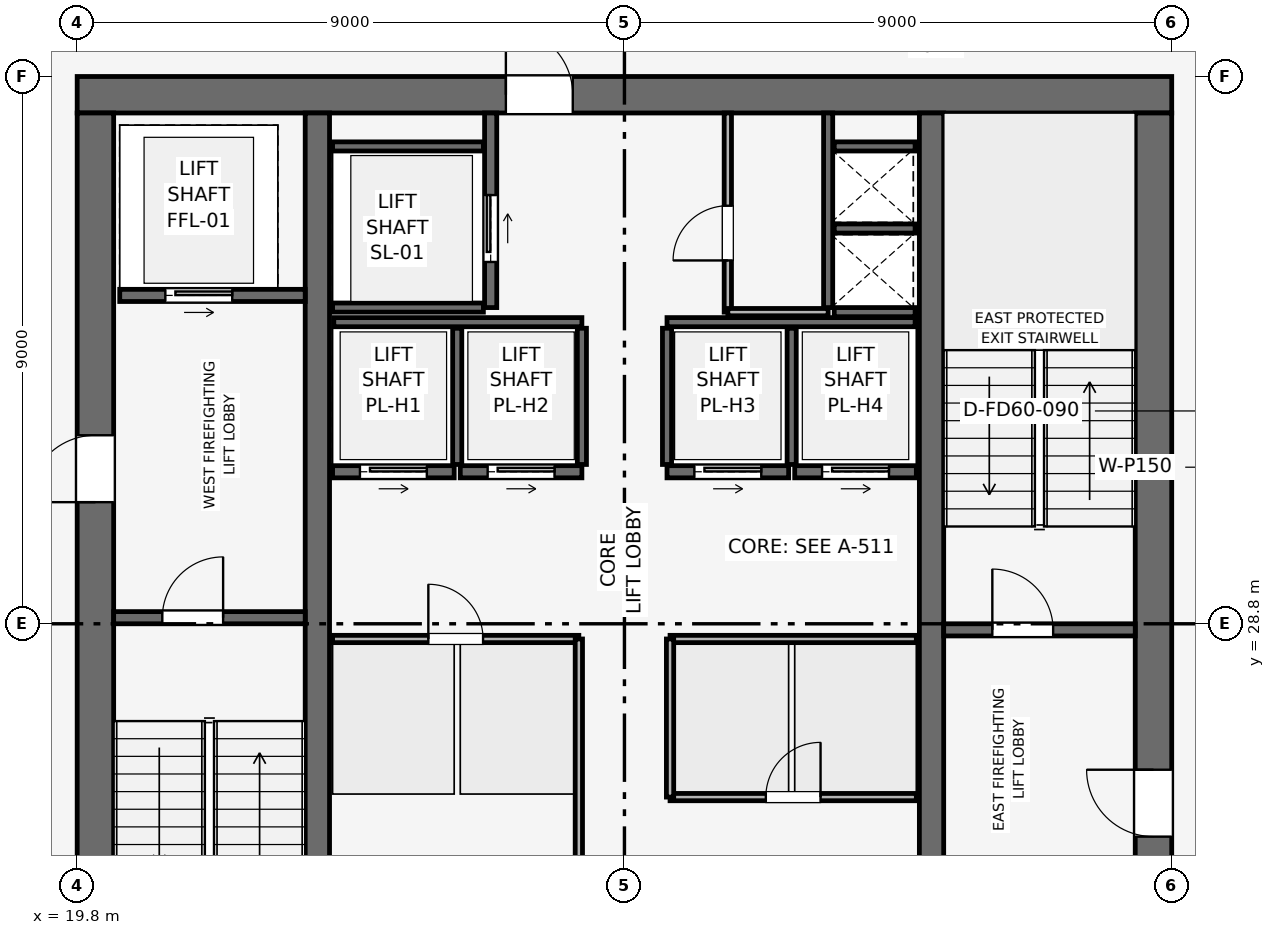
"""IFC4 building model, lengths in metres.
Left out: names, types, materials, properties, quantities, classifications, styles, units other than length and angle.
Written with IfcOpenShell. Run it as: python <this file> out.ifc"""

import sys

from ifc_helpers import new_model, si_unit, direction, frame, frame_2d, origin, place, context, subcontext, project, spatial, rectangle, extrude, element, fill, save


model = new_model("IFC4")
c1 = context("Model", 3, precision=1e-05, world=origin(), true_north=direction((0.0, 1.0)))
c2 = subcontext(c1, "Body", "Model", "MODEL_VIEW")
j1 = project(units=[si_unit("LENGTHUNIT", "METRE"), si_unit("PLANEANGLEUNIT", "RADIAN")], contexts=[c1])
p1 = place(None, origin())
s1 = spatial("IfcSite", under=j1, at=p1, CompositionType="ELEMENT")
p2 = place(p1, origin())
s2 = spatial("IfcBuilding", under=s1, at=p2, CompositionType="ELEMENT")
p3 = place(p2, frame((0.0, 0.0, 325.5)))
s3 = spatial("IfcBuildingStorey", under=s2, at=p3, CompositionType="ELEMENT", Elevation=325.5)
p4 = place(p3, frame((19.8, 37.5, 0.0), z_axis=(0.0, 0.0, 1.0), x_axis=(1.0, 0.0, 0.0)))
e1 = element("IfcWall", 1, at=p4, inside=s3, PredefinedType="SHEAR", context=c2, shape_type="SweptSolid", body=[
    extrude(rectangle(XDim=18.0, YDim=0.6, at=frame_2d((9.0, 0.0))), origin(), (0.0, 0.0, 1.0), 3.75),
])
p5 = place(p4, frame((7.05, 0.0, 0.0)))
e2 = element("IfcOpeningElement", 2, at=p5, cuts=e1, PredefinedType="OPENING", context=c2, shape_type="SweptSolid", body=[
    extrude(rectangle(XDim=1.1, YDim=2.15, at=frame_2d((0.55, 1.075))), frame((0.0, 0.31, 0.0), z_axis=(0.0, -1.0, 0.0), x_axis=(1.0, 0.0, 0.0)), (0.0, 0.0, 1.0), 0.62),
])
p6 = place(p3, frame((20.1, 20.4, 0.0), z_axis=(0.0, 0.0, 1.0), x_axis=(0.0, 1.0, 0.0)))
e3 = element("IfcWall", 3, at=p6, inside=s3, PredefinedType="SHEAR", context=c2, shape_type="SweptSolid", body=[
    extrude(rectangle(XDim=16.8, YDim=0.6, at=frame_2d((8.4, 0.0))), origin(), (0.0, 0.0, 1.0), 3.75),
])
p7 = place(p6, frame((10.4, 0.0, 0.0)))
e4 = element("IfcOpeningElement", 4, at=p7, cuts=e3, PredefinedType="OPENING", context=c2, shape_type="SweptSolid", body=[
    extrude(rectangle(XDim=1.1, YDim=2.15, at=frame_2d((0.55, 1.075))), frame((0.0, 0.31, 0.0), z_axis=(0.0, -1.0, 0.0), x_axis=(1.0, 0.0, 0.0)), (0.0, 0.0, 1.0), 0.62),
])
p8 = place(p3, frame((37.5, 20.4, 0.0), z_axis=(0.0, 0.0, 1.0), x_axis=(0.0, 1.0, 0.0)))
e5 = element("IfcWall", 5, at=p8, inside=s3, PredefinedType="SHEAR", context=c2, shape_type="SweptSolid", body=[
    extrude(rectangle(XDim=16.8, YDim=0.6, at=frame_2d((8.4, 0.0))), origin(), (0.0, 0.0, 1.0), 3.75),
])
p9 = place(p8, frame((4.9, 0.0, 0.0)))
e6 = element("IfcOpeningElement", 6, at=p9, cuts=e5, PredefinedType="OPENING", context=c2, shape_type="SweptSolid", body=[
    extrude(rectangle(XDim=1.1, YDim=2.15, at=frame_2d((0.55, 1.075))), frame((0.0, 0.31, 0.0), z_axis=(0.0, -1.0, 0.0), x_axis=(1.0, 0.0, 0.0)), (0.0, 0.0, 1.0), 0.62),
])
for number, where, z_axis, x_axis in (
    (7, (23.75, 20.4, 0.0), (0.0, 0.0, 1.0), (0.0, 1.0, 0.0)),
    (8, (33.85, 20.4, 0.0), (0.0, 0.0, 1.0), (0.0, 1.0, 0.0)),
):
    element("IfcWall", number, at=place(p3, frame(where, z_axis=z_axis, x_axis=x_axis)), inside=s3, PredefinedType="SHEAR", context=c2, shape_type="SweptSolid", body=[
        extrude(rectangle(XDim=16.8, YDim=0.4, at=frame_2d((8.4, 0.0))), origin(), (0.0, 0.0, 1.0), 3.75),
    ])
p10 = place(p3, frame((20.4, 28.9, 0.0), z_axis=(0.0, 0.0, 1.0), x_axis=(1.0, 0.0, 0.0)))
e9 = element("IfcWall", 9, at=p10, inside=s3, PredefinedType="SHEAR", context=c2, shape_type="SweptSolid", body=[
    extrude(rectangle(XDim=3.15, YDim=0.2, at=frame_2d((1.575, 0.0))), origin(), (0.0, 0.0, 1.0), 3.51),
])
p11 = place(p10, frame((0.8, 0.0, 0.0)))
e10 = element("IfcOpeningElement", 10, at=p11, cuts=e9, PredefinedType="OPENING", context=c2, shape_type="SweptSolid", body=[
    extrude(rectangle(XDim=1.0, YDim=2.1, at=frame_2d((0.5, 1.05))), frame((0.0, 0.11, 0.0), z_axis=(0.0, -1.0, 0.0), x_axis=(1.0, 0.0, 0.0)), (0.0, 0.0, 1.0), 0.22),
])
p12 = place(p3, frame((34.05, 28.7, 0.0), z_axis=(0.0, 0.0, 1.0), x_axis=(1.0, 0.0, 0.0)))
e11 = element("IfcWall", 11, at=p12, inside=s3, PredefinedType="SHEAR", context=c2, shape_type="SweptSolid", body=[
    extrude(rectangle(XDim=3.15, YDim=0.2, at=frame_2d((1.575, 0.0))), origin(), (0.0, 0.0, 1.0), 3.51),
])
p13 = place(p12, frame((0.8, 0.0, 0.0)))
e12 = element("IfcOpeningElement", 12, at=p13, cuts=e11, PredefinedType="OPENING", context=c2, shape_type="SweptSolid", body=[
    extrude(rectangle(XDim=1.0, YDim=2.1, at=frame_2d((0.5, 1.05))), frame((0.0, 0.11, 0.0), z_axis=(0.0, -1.0, 0.0), x_axis=(1.0, 0.0, 0.0)), (0.0, 0.0, 1.0), 0.22),
])
p14 = place(p3, frame((32.15, 34.0, 0.0), z_axis=(0.0, 0.0, 1.0), x_axis=(0.0, 1.0, 0.0)))
e13 = element("IfcWall", 13, at=p14, inside=s3, PredefinedType="SHEAR", context=c2, shape_type="SweptSolid", body=[
    extrude(rectangle(XDim=3.2, YDim=0.15, at=frame_2d((1.6, 0.0))), origin(), (0.0, 0.0, 1.0), 3.51),
])
for number, where, z_axis, x_axis in (
    (14, (32.25, 33.925, 0.0), (0.0, 0.0, 1.0), (1.0, 0.0, 0.0)),
    (15, (32.25, 35.3, 0.0), (0.0, 0.0, 1.0), (1.0, 0.0, 0.0)),
):
    element("IfcWall", number, at=place(p3, frame(where, z_axis=z_axis, x_axis=x_axis)), inside=s3, PredefinedType="SHEAR", context=c2, shape_type="SweptSolid", body=[
        extrude(rectangle(XDim=1.33, YDim=0.15, at=frame_2d((0.665, 0.0))), origin(), (0.0, 0.0, 1.0), 3.51),
    ])
p15 = place(p3, frame((20.5, 34.2, 0.0), z_axis=(0.0, 0.0, 1.0), x_axis=(1.0, 0.0, 0.0)))
e16 = element("IfcWall", 16, at=p15, inside=s3, PredefinedType="SHEAR", context=c2, shape_type="SweptSolid", body=[
    extrude(rectangle(XDim=3.05, YDim=0.2, at=frame_2d((1.525, 0.0))), origin(), (0.0, 0.0, 1.0), 3.51),
])
p16 = place(p15, frame((0.75, 0.0, 0.0)))
e17 = element("IfcOpeningElement", 17, at=p16, cuts=e16, PredefinedType="OPENING", context=c2, shape_type="SweptSolid", body=[
    extrude(rectangle(XDim=1.1, YDim=2.15, at=frame_2d((0.55, 1.075))), frame((0.0, 0.11, 0.0), z_axis=(0.0, -1.0, 0.0), x_axis=(1.0, 0.0, 0.0)), (0.0, 0.0, 1.0), 0.22),
])
p17 = place(p3, frame((26.6, 34.0, 0.0), z_axis=(0.0, 0.0, 1.0), x_axis=(0.0, 1.0, 0.0)))
e18 = element("IfcWall", 18, at=p17, inside=s3, PredefinedType="SHEAR", context=c2, shape_type="SweptSolid", body=[
    extrude(rectangle(XDim=3.2, YDim=0.2, at=frame_2d((1.6, 0.0))), origin(), (0.0, 0.0, 1.0), 3.51),
])
p18 = place(p17, frame((0.75, 0.0, 0.0)))
e19 = element("IfcOpeningElement", 19, at=p18, cuts=e18, PredefinedType="OPENING", context=c2, shape_type="SweptSolid", body=[
    extrude(rectangle(XDim=1.1, YDim=2.15, at=frame_2d((0.55, 1.075))), frame((0.0, 0.11, 0.0), z_axis=(0.0, -1.0, 0.0), x_axis=(1.0, 0.0, 0.0)), (0.0, 0.0, 1.0), 0.22),
])
for number, where, z_axis, x_axis in (
    (20, (24.0, 34.0, 0.0), (0.0, 0.0, 1.0), (1.0, 0.0, 0.0)),
    (21, (24.0, 36.65, 0.0), (0.0, 0.0, 1.0), (1.0, 0.0, 0.0)),
):
    element("IfcWall", number, at=place(p3, frame(where, z_axis=z_axis, x_axis=x_axis)), inside=s3, PredefinedType="SHEAR", context=c2, shape_type="SweptSolid", body=[
        extrude(rectangle(XDim=2.48, YDim=0.15, at=frame_2d((1.24, 0.0))), origin(), (0.0, 0.0, 1.0), 3.51),
    ])
p19 = place(p3, frame((24.0, 31.3, 0.0), z_axis=(0.0, 0.0, 1.0), x_axis=(1.0, 0.0, 0.0)))
e22 = element("IfcWall", 22, at=p19, inside=s3, PredefinedType="SHEAR", context=c2, shape_type="SweptSolid", body=[
    extrude(rectangle(XDim=2.0, YDim=0.2, at=frame_2d((1.0, 0.0))), origin(), (0.0, 0.0, 1.0), 3.51),
])
p20 = place(p19, frame((0.45, 0.0, 0.0)))
e23 = element("IfcOpeningElement", 23, at=p20, cuts=e22, PredefinedType="OPENING", context=c2, shape_type="SweptSolid", body=[
    extrude(rectangle(XDim=1.1, YDim=2.15, at=frame_2d((0.55, 1.075))), frame((0.0, 0.11, 0.0), z_axis=(0.0, -1.0, 0.0), x_axis=(1.0, 0.0, 0.0)), (0.0, 0.0, 1.0), 0.22),
])
p21 = place(p3, frame((26.1, 31.3, 0.0), z_axis=(0.0, 0.0, 1.0), x_axis=(1.0, 0.0, 0.0)))
e24 = element("IfcWall", 24, at=p21, inside=s3, PredefinedType="SHEAR", context=c2, shape_type="SweptSolid", body=[
    extrude(rectangle(XDim=2.0, YDim=0.2, at=frame_2d((1.0, 0.0))), origin(), (0.0, 0.0, 1.0), 3.51),
])
p22 = place(p21, frame((0.45, 0.0, 0.0)))
e25 = element("IfcOpeningElement", 25, at=p22, cuts=e24, PredefinedType="OPENING", context=c2, shape_type="SweptSolid", body=[
    extrude(rectangle(XDim=1.1, YDim=2.15, at=frame_2d((0.55, 1.075))), frame((0.0, 0.11, 0.0), z_axis=(0.0, -1.0, 0.0), x_axis=(1.0, 0.0, 0.0)), (0.0, 0.0, 1.0), 0.22),
])
p23 = place(p3, frame((29.5, 31.3, 0.0), z_axis=(0.0, 0.0, 1.0), x_axis=(1.0, 0.0, 0.0)))
e26 = element("IfcWall", 26, at=p23, inside=s3, PredefinedType="SHEAR", context=c2, shape_type="SweptSolid", body=[
    extrude(rectangle(XDim=2.0, YDim=0.2, at=frame_2d((1.0, 0.0))), origin(), (0.0, 0.0, 1.0), 3.51),
])
p24 = place(p23, frame((0.45, 0.0, 0.0)))
e27 = element("IfcOpeningElement", 27, at=p24, cuts=e26, PredefinedType="OPENING", context=c2, shape_type="SweptSolid", body=[
    extrude(rectangle(XDim=1.1, YDim=2.15, at=frame_2d((0.55, 1.075))), frame((0.0, 0.11, 0.0), z_axis=(0.0, -1.0, 0.0), x_axis=(1.0, 0.0, 0.0)), (0.0, 0.0, 1.0), 0.22),
])
p25 = place(p3, frame((31.6, 31.3, 0.0), z_axis=(0.0, 0.0, 1.0), x_axis=(1.0, 0.0, 0.0)))
e28 = element("IfcWall", 28, at=p25, inside=s3, PredefinedType="SHEAR", context=c2, shape_type="SweptSolid", body=[
    extrude(rectangle(XDim=2.0, YDim=0.2, at=frame_2d((1.0, 0.0))), origin(), (0.0, 0.0, 1.0), 3.51),
])
p26 = place(p25, frame((0.45, 0.0, 0.0)))
e29 = element("IfcOpeningElement", 29, at=p26, cuts=e28, PredefinedType="OPENING", context=c2, shape_type="SweptSolid", body=[
    extrude(rectangle(XDim=1.1, YDim=2.15, at=frame_2d((0.55, 1.075))), frame((0.0, 0.11, 0.0), z_axis=(0.0, -1.0, 0.0), x_axis=(1.0, 0.0, 0.0)), (0.0, 0.0, 1.0), 0.22),
])
p27 = place(p3, frame((32.25, 36.65, 0.0), z_axis=(0.0, 0.0, 1.0), x_axis=(1.0, 0.0, 0.0)))
e30 = element("IfcWall", 30, at=p27, inside=s3, PredefinedType="SHEAR", context=c2, shape_type="SweptSolid", body=[
    extrude(rectangle(XDim=1.33, YDim=0.15, at=frame_2d((0.665, 0.0))), origin(), (0.0, 0.0, 1.0), 3.51),
])
for number, where, z_axis, x_axis in (
    (31, (24.02, 33.76, 0.0), (0.0, 0.0, 1.0), (1.0, 0.0, 0.0)),
    (32, (29.5, 33.76, 0.0), (0.0, 0.0, 1.0), (1.0, 0.0, 0.0)),
):
    element("IfcWall", number, at=place(p3, frame(where, z_axis=z_axis, x_axis=x_axis)), inside=s3, PredefinedType="SHEAR", context=c2, shape_type="SweptSolid", body=[
        extrude(rectangle(XDim=4.08, YDim=0.15, at=frame_2d((2.04, 0.0))), origin(), (0.0, 0.0, 1.0), 3.51),
    ])
for number, where, z_axis, x_axis in (
    (33, (26.05, 31.42, 0.0), (0.0, 0.0, 1.0), (0.0, 1.0, 0.0)),
    (34, (28.1, 31.42, 0.0), (0.0, 0.0, 1.0), (0.0, 1.0, 0.0)),
    (35, (29.5, 31.42, 0.0), (0.0, 0.0, 1.0), (0.0, 1.0, 0.0)),
    (36, (31.55, 31.42, 0.0), (0.0, 0.0, 1.0), (0.0, 1.0, 0.0)),
):
    element("IfcWall", number, at=place(p3, frame(where, z_axis=z_axis, x_axis=x_axis)), inside=s3, PredefinedType="SHEAR", context=c2, shape_type="SweptSolid", body=[
        extrude(rectangle(XDim=2.24, YDim=0.15, at=frame_2d((1.12, 0.0))), origin(), (0.0, 0.0, 1.0), 3.51),
    ])
p28 = place(p3, frame((30.5, 33.925, 0.0), z_axis=(0.0, 0.0, 1.0), x_axis=(0.0, 1.0, 0.0)))
e37 = element("IfcWall", 37, at=p28, inside=s3, PredefinedType="PARTITIONING", context=c2, shape_type="SweptSolid", body=[
    extrude(rectangle(XDim=3.275, YDim=0.12, at=frame_2d((1.637, 0.0))), origin(), (0.0, 0.0, 1.0), 3.51),
])
p29 = place(p28, frame((0.85, 0.0, 0.0)))
e38 = element("IfcOpeningElement", 38, at=p29, cuts=e37, PredefinedType="OPENING", context=c2, shape_type="SweptSolid", body=[
    extrude(rectangle(XDim=0.9, YDim=2.1, at=frame_2d((0.45, 1.05))), frame((0.0, 0.07, 0.0), z_axis=(0.0, -1.0, 0.0), x_axis=(1.0, 0.0, 0.0)), (0.0, 0.0, 1.0), 0.14),
])
p30 = place(p3, frame((30.5, 33.925, 0.0), z_axis=(0.0, 0.0, 1.0), x_axis=(1.0, 0.0, 0.0)))
e39 = element("IfcWall", 39, at=p30, inside=s3, PredefinedType="PARTITIONING", context=c2, shape_type="SweptSolid", body=[
    extrude(rectangle(XDim=1.65, YDim=0.12, at=frame_2d((0.825, 0.0))), origin(), (0.0, 0.0, 1.0), 3.51),
])
p31 = place(p3, frame((24.0, 28.55, 0.0), z_axis=(0.0, 0.0, 1.0), x_axis=(1.0, 0.0, 0.0)))
e40 = element("IfcWall", 40, at=p31, inside=s3, PredefinedType="PARTITIONING", context=c2, shape_type="SweptSolid", body=[
    extrude(rectangle(XDim=4.05, YDim=0.12, at=frame_2d((2.025, 0.0))), origin(), (0.0, 0.0, 1.0), 3.51),
])
p32 = place(p31, frame((1.575, 0.0, 0.0)))
e41 = element("IfcOpeningElement", 41, at=p32, cuts=e40, PredefinedType="OPENING", context=c2, shape_type="SweptSolid", body=[
    extrude(rectangle(XDim=0.9, YDim=2.1, at=frame_2d((0.45, 1.05))), frame((0.0, 0.07, 0.0), z_axis=(0.0, -1.0, 0.0), x_axis=(1.0, 0.0, 0.0)), (0.0, 0.0, 1.0), 0.14),
])
p33 = place(p3, frame((28.05, 20.4, 0.0), z_axis=(0.0, 0.0, 1.0), x_axis=(0.0, 1.0, 0.0)))
e42 = element("IfcWall", 42, at=p33, inside=s3, PredefinedType="PARTITIONING", context=c2, shape_type="SweptSolid", body=[
    extrude(rectangle(XDim=8.15, YDim=0.12, at=frame_2d((4.075, 0.0))), origin(), (0.0, 0.0, 1.0), 3.51),
])
p34 = place(p3, frame((29.55, 25.95, 0.0), z_axis=(0.0, 0.0, 1.0), x_axis=(1.0, 0.0, 0.0)))
e43 = element("IfcWall", 43, at=p34, inside=s3, PredefinedType="PARTITIONING", context=c2, shape_type="SweptSolid", body=[
    extrude(rectangle(XDim=4.05, YDim=0.12, at=frame_2d((2.025, 0.0))), origin(), (0.0, 0.0, 1.0), 3.51),
])
p35 = place(p34, frame((1.575, 0.0, 0.0)))
e44 = element("IfcOpeningElement", 44, at=p35, cuts=e43, PredefinedType="OPENING", context=c2, shape_type="SweptSolid", body=[
    extrude(rectangle(XDim=0.9, YDim=2.1, at=frame_2d((0.45, 1.05))), frame((0.0, 0.07, 0.0), z_axis=(0.0, -1.0, 0.0), x_axis=(1.0, 0.0, 0.0)), (0.0, 0.0, 1.0), 0.14),
])
p36 = place(p3, frame((29.55, 28.55, 0.0), z_axis=(0.0, 0.0, 1.0), x_axis=(1.0, 0.0, 0.0)))
e45 = element("IfcWall", 45, at=p36, inside=s3, PredefinedType="PARTITIONING", context=c2, shape_type="SweptSolid", body=[
    extrude(rectangle(XDim=4.05, YDim=0.12, at=frame_2d((2.025, 0.0))), origin(), (0.0, 0.0, 1.0), 3.51),
])
p37 = place(p3, frame((29.55, 25.95, 0.0), z_axis=(0.0, 0.0, 1.0), x_axis=(0.0, 1.0, 0.0)))
e46 = element("IfcWall", 46, at=p37, inside=s3, PredefinedType="PARTITIONING", context=c2, shape_type="SweptSolid", body=[
    extrude(rectangle(XDim=2.6, YDim=0.12, at=frame_2d((1.3, 0.0))), origin(), (0.0, 0.0, 1.0), 3.51),
])
p38 = place(p11, origin())
e47 = element("IfcDoor", 47, at=p38, inside=s3, OperationType="SINGLE_SWING_RIGHT", PredefinedType="DOOR", context=c2, shape_type="SweptSolid", body=[
    extrude(rectangle(XDim=1.0, YDim=2.1, at=frame_2d((0.5, 1.05))), frame((0.0, 0.025, 0.0), z_axis=(0.0, -1.0, 0.0), x_axis=(1.0, 0.0, 0.0)), (0.0, 0.0, 1.0), 0.05),
])
fill(e10, e47)
p39 = place(p13, origin())
e48 = element("IfcDoor", 48, at=p39, inside=s3, OperationType="SINGLE_SWING_LEFT", PredefinedType="DOOR", context=c2, shape_type="SweptSolid", body=[
    extrude(rectangle(XDim=1.0, YDim=2.1, at=frame_2d((0.5, 1.05))), frame((0.0, 0.025, 0.0), z_axis=(0.0, -1.0, 0.0), x_axis=(1.0, 0.0, 0.0)), (0.0, 0.0, 1.0), 0.05),
])
fill(e12, e48)
p40 = place(p16, origin())
e49 = element("IfcDoor", 49, at=p40, inside=s3, OperationType="SLIDING_TO_RIGHT", PredefinedType="DOOR", context=c2, shape_type="SweptSolid", body=[
    extrude(rectangle(XDim=1.1, YDim=2.15, at=frame_2d((0.55, 1.075))), frame((0.0, 0.025, 0.0), z_axis=(0.0, -1.0, 0.0), x_axis=(1.0, 0.0, 0.0)), (0.0, 0.0, 1.0), 0.05),
])
fill(e17, e49)
p41 = place(p18, origin())
e50 = element("IfcDoor", 50, at=p41, inside=s3, OperationType="SLIDING_TO_RIGHT", PredefinedType="DOOR", context=c2, shape_type="SweptSolid", body=[
    extrude(rectangle(XDim=1.1, YDim=2.15, at=frame_2d((0.55, 1.075))), frame((0.0, 0.025, 0.0), z_axis=(0.0, -1.0, 0.0), x_axis=(1.0, 0.0, 0.0)), (0.0, 0.0, 1.0), 0.05),
])
fill(e19, e50)
p42 = place(p20, origin())
e51 = element("IfcDoor", 51, at=p42, inside=s3, OperationType="SLIDING_TO_RIGHT", PredefinedType="DOOR", context=c2, shape_type="SweptSolid", body=[
    extrude(rectangle(XDim=1.1, YDim=2.15, at=frame_2d((0.55, 1.075))), frame((0.0, 0.025, 0.0), z_axis=(0.0, -1.0, 0.0), x_axis=(1.0, 0.0, 0.0)), (0.0, 0.0, 1.0), 0.05),
])
fill(e23, e51)
p43 = place(p22, origin())
e52 = element("IfcDoor", 52, at=p43, inside=s3, OperationType="SLIDING_TO_RIGHT", PredefinedType="DOOR", context=c2, shape_type="SweptSolid", body=[
    extrude(rectangle(XDim=1.1, YDim=2.15, at=frame_2d((0.55, 1.075))), frame((0.0, 0.025, 0.0), z_axis=(0.0, -1.0, 0.0), x_axis=(1.0, 0.0, 0.0)), (0.0, 0.0, 1.0), 0.05),
])
fill(e25, e52)
p44 = place(p24, origin())
e53 = element("IfcDoor", 53, at=p44, inside=s3, OperationType="SLIDING_TO_RIGHT", PredefinedType="DOOR", context=c2, shape_type="SweptSolid", body=[
    extrude(rectangle(XDim=1.1, YDim=2.15, at=frame_2d((0.55, 1.075))), frame((0.0, 0.025, 0.0), z_axis=(0.0, -1.0, 0.0), x_axis=(1.0, 0.0, 0.0)), (0.0, 0.0, 1.0), 0.05),
])
fill(e27, e53)
p45 = place(p26, origin())
e54 = element("IfcDoor", 54, at=p45, inside=s3, OperationType="SLIDING_TO_RIGHT", PredefinedType="DOOR", context=c2, shape_type="SweptSolid", body=[
    extrude(rectangle(XDim=1.1, YDim=2.15, at=frame_2d((0.55, 1.075))), frame((0.0, 0.025, 0.0), z_axis=(0.0, -1.0, 0.0), x_axis=(1.0, 0.0, 0.0)), (0.0, 0.0, 1.0), 0.05),
])
fill(e29, e54)
p46 = place(p29, origin())
e55 = element("IfcDoor", 55, at=p46, inside=s3, OperationType="SINGLE_SWING_LEFT", PredefinedType="DOOR", context=c2, shape_type="SweptSolid", body=[
    extrude(rectangle(XDim=0.9, YDim=2.1, at=frame_2d((0.45, 1.05))), frame((0.0, 0.025, 0.0), z_axis=(0.0, -1.0, 0.0), x_axis=(1.0, 0.0, 0.0)), (0.0, 0.0, 1.0), 0.05),
])
fill(e38, e55)
p47 = place(p32, origin())
e56 = element("IfcDoor", 56, at=p47, inside=s3, OperationType="SINGLE_SWING_LEFT", PredefinedType="DOOR", context=c2, shape_type="SweptSolid", body=[
    extrude(rectangle(XDim=0.9, YDim=2.1, at=frame_2d((0.45, 1.05))), frame((0.0, 0.025, 0.0), z_axis=(0.0, -1.0, 0.0), x_axis=(1.0, 0.0, 0.0)), (0.0, 0.0, 1.0), 0.05),
])
fill(e41, e56)
p48 = place(p35, origin())
e57 = element("IfcDoor", 57, at=p48, inside=s3, OperationType="SINGLE_SWING_RIGHT", PredefinedType="DOOR", context=c2, shape_type="SweptSolid", body=[
    extrude(rectangle(XDim=0.9, YDim=2.1, at=frame_2d((0.45, 1.05))), frame((0.0, 0.025, 0.0), z_axis=(0.0, -1.0, 0.0), x_axis=(1.0, 0.0, 0.0)), (0.0, 0.0, 1.0), 0.05),
])
fill(e44, e57)
p49 = place(p7, origin())
e58 = element("IfcDoor", 58, at=p49, inside=s3, OperationType="SINGLE_SWING_LEFT", PredefinedType="DOOR", context=c2, shape_type="SweptSolid", body=[
    extrude(rectangle(XDim=1.1, YDim=2.15, at=frame_2d((0.55, 1.075))), frame((0.0, 0.025, 0.0), z_axis=(0.0, -1.0, 0.0), x_axis=(1.0, 0.0, 0.0)), (0.0, 0.0, 1.0), 0.05),
])
fill(e4, e58)
p50 = place(p9, origin())
e59 = element("IfcDoor", 59, at=p50, inside=s3, OperationType="SINGLE_SWING_RIGHT", PredefinedType="DOOR", context=c2, shape_type="SweptSolid", body=[
    extrude(rectangle(XDim=1.1, YDim=2.15, at=frame_2d((0.55, 1.075))), frame((0.0, 0.025, 0.0), z_axis=(0.0, -1.0, 0.0), x_axis=(1.0, 0.0, 0.0)), (0.0, 0.0, 1.0), 0.05),
])
fill(e6, e59)
p51 = place(p5, origin())
e60 = element("IfcDoor", 60, at=p51, inside=s3, OperationType="SINGLE_SWING_LEFT", PredefinedType="DOOR", context=c2, shape_type="SweptSolid", body=[
    extrude(rectangle(XDim=1.1, YDim=2.15, at=frame_2d((0.55, 1.075))), frame((0.0, 0.025, 0.0), z_axis=(0.0, -1.0, 0.0), x_axis=(1.0, 0.0, 0.0)), (0.0, 0.0, 1.0), 0.05),
])
fill(e2, e60)
save(model, sys.argv[1])
